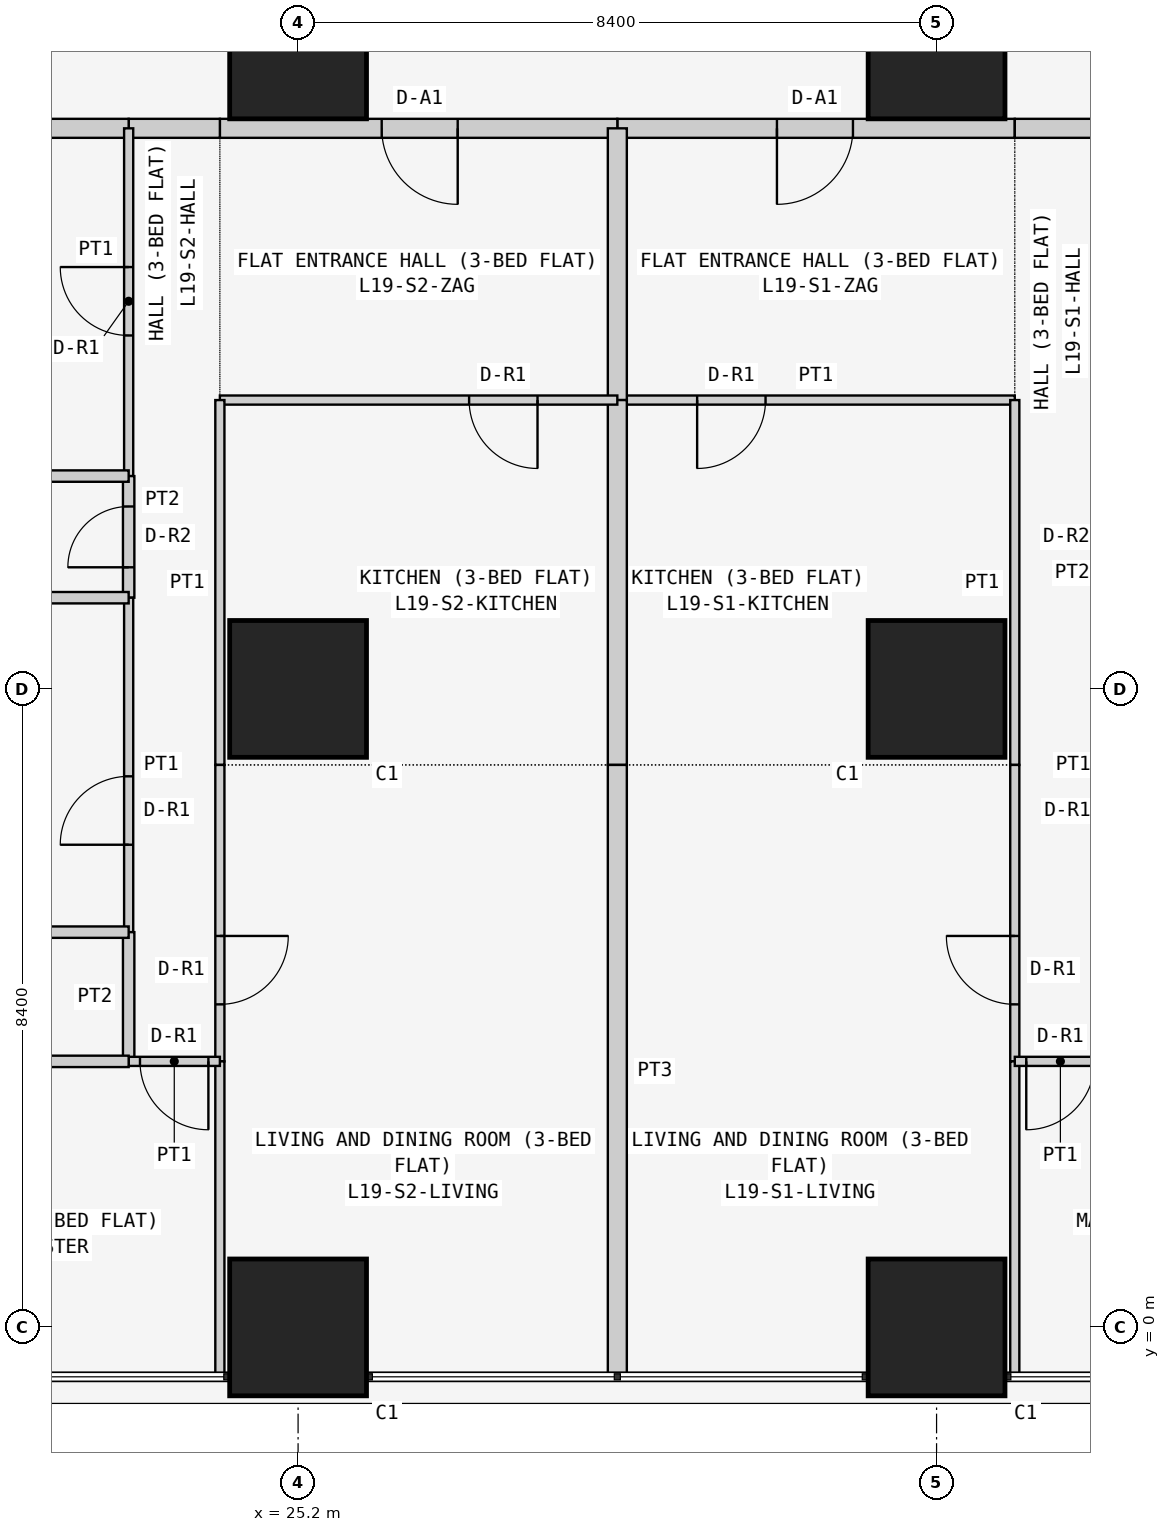
"""IFC4 building model, lengths in metres.
Left out: names, types, materials, properties, quantities, classifications, styles, units other than length and angle.
Written with IfcOpenShell. Run it as: python <this file> out.ifc"""

import sys

from ifc_helpers import new_model, si_unit, direction, frame, frame_2d, origin, origin_2d, place, context, subcontext, project, spatial, rectangle, extrude, element, fill, save


model = new_model("IFC4")
c1 = context("Model", 3, precision=1e-05, world=origin(), true_north=direction((0.0, 1.0)))
c2 = subcontext(c1, "Body", "Model", "MODEL_VIEW")
j1 = project(units=[si_unit("LENGTHUNIT", "METRE"), si_unit("PLANEANGLEUNIT", "RADIAN")], contexts=[c1])
p1 = place(None, origin())
s1 = spatial("IfcSite", under=j1, at=p1, CompositionType="ELEMENT")
p2 = place(p1, origin())
s2 = spatial("IfcBuilding", under=s1, at=p2, CompositionType="ELEMENT")
p3 = place(p2, frame((0.0, 0.0, 77.7)))
s3 = spatial("IfcBuildingStorey", under=s2, at=p3, CompositionType="ELEMENT", Elevation=77.7)
for number, where, z_axis, x_axis in (
    (1, (25.2, 0.0, 0.0), (0.0, 0.0, 1.0), (1.0, 0.0, 0.0)),
    (2, (25.2, 8.4, 0.0), (0.0, 0.0, 1.0), (1.0, 0.0, 0.0)),
    (3, (25.2, 16.8, 0.0), (0.0, 0.0, 1.0), (1.0, 0.0, 0.0)),
    (4, (33.6, 0.0, 0.0), (0.0, 0.0, 1.0), (1.0, 0.0, 0.0)),
    (5, (33.6, 8.4, 0.0), (0.0, 0.0, 1.0), (1.0, 0.0, 0.0)),
    (6, (33.6, 16.8, 0.0), (0.0, 0.0, 1.0), (1.0, 0.0, 0.0)),
):
    element("IfcColumn", number, at=place(p3, frame(where, z_axis=z_axis, x_axis=x_axis)), inside=s3, PredefinedType="COLUMN", context=c2, shape_type="SweptSolid", body=[
        extrude(rectangle(XDim=1.8, YDim=1.8, at=origin_2d()), origin(), (0.0, 0.0, 1.0), 3.6),
    ])
p4 = place(p3, frame((34.629, 15.775, 0.0), z_axis=(0.0, 0.0, 1.0), x_axis=(-1.0, 0.0, 0.0)))
e7 = element("IfcWall", 7, at=p4, inside=s3, PredefinedType="PARTITIONING", context=c2, shape_type="SweptSolid", body=[
    extrude(rectangle(XDim=5.229, YDim=0.25, at=frame_2d((2.615, 0.0))), origin(), (0.0, 0.0, 1.0), 3.45),
])
p5 = place(p4, frame((2.129, 0.0, 0.0)))
e8 = element("IfcOpeningElement", 8, at=p5, cuts=e7, PredefinedType="OPENING", context=c2, shape_type="SweptSolid", body=[
    extrude(rectangle(XDim=1.0, YDim=2.1, at=frame_2d((0.5, 1.05))), frame((0.0, 0.135, 0.0), z_axis=(0.0, -1.0, 0.0), x_axis=(1.0, 0.0, 0.0)), (0.0, 0.0, 1.0), 0.27),
])
p6 = place(p3, frame((35.829, 15.775, 0.0), z_axis=(0.0, 0.0, 1.0), x_axis=(-1.0, 0.0, 0.0)))
e9 = element("IfcWall", 9, at=p6, inside=s3, PredefinedType="PARTITIONING", context=c2, shape_type="SweptSolid", body=[
    extrude(rectangle(XDim=1.2, YDim=0.25, at=frame_2d((0.6, 0.0))), origin(), (0.0, 0.0, 1.0), 3.45),
])
p7 = place(p3, frame((29.4, 15.775, 0.0), z_axis=(0.0, 0.0, 1.0), x_axis=(-1.0, 0.0, 0.0)))
e10 = element("IfcWall", 10, at=p7, inside=s3, PredefinedType="PARTITIONING", context=c2, shape_type="SweptSolid", body=[
    extrude(rectangle(XDim=5.229, YDim=0.25, at=frame_2d((2.615, 0.0))), origin(), (0.0, 0.0, 1.0), 3.45),
])
p8 = place(p7, frame((2.1, 0.0, 0.0)))
e11 = element("IfcOpeningElement", 11, at=p8, cuts=e10, PredefinedType="OPENING", context=c2, shape_type="SweptSolid", body=[
    extrude(rectangle(XDim=1.0, YDim=2.1, at=frame_2d((0.5, 1.05))), frame((0.0, 0.135, 0.0), z_axis=(0.0, -1.0, 0.0), x_axis=(1.0, 0.0, 0.0)), (0.0, 0.0, 1.0), 0.27),
])
p9 = place(p3, frame((24.171, 15.775, 0.0), z_axis=(0.0, 0.0, 1.0), x_axis=(-1.0, 0.0, 0.0)))
e12 = element("IfcWall", 12, at=p9, inside=s3, PredefinedType="PARTITIONING", context=c2, shape_type="SweptSolid", body=[
    extrude(rectangle(XDim=1.2, YDim=0.25, at=frame_2d((0.6, 0.0))), origin(), (0.0, 0.0, 1.0), 3.45),
])
p10 = place(p3, frame((22.971, 15.775, 0.0), z_axis=(0.0, 0.0, 1.0), x_axis=(-1.0, 0.0, 0.0)))
e13 = element("IfcWall", 13, at=p10, inside=s3, PredefinedType="PARTITIONING", context=c2, shape_type="SweptSolid", body=[
    extrude(rectangle(XDim=6.871, YDim=0.25, at=frame_2d((3.436, 0.0))), origin(), (0.0, 0.0, 1.0), 3.45),
])
p11 = place(p3, frame((29.4, 12.2, 0.0), z_axis=(0.0, 0.0, 1.0), x_axis=(1.0, 0.0, 0.0)))
e14 = element("IfcWall", 14, at=p11, inside=s3, PredefinedType="PARTITIONING", context=c2, shape_type="SweptSolid", body=[
    extrude(rectangle(XDim=5.229, YDim=0.12, at=frame_2d((2.615, 0.0))), origin(), (0.0, 0.0, 1.0), 3.45),
])
p12 = place(p11, frame((1.05, 0.0, 0.0)))
e15 = element("IfcOpeningElement", 15, at=p12, cuts=e14, PredefinedType="OPENING", context=c2, shape_type="SweptSolid", body=[
    extrude(rectangle(XDim=0.9, YDim=2.1, at=frame_2d((0.45, 1.05))), frame((0.0, 0.07, 0.0), z_axis=(0.0, -1.0, 0.0), x_axis=(1.0, 0.0, 0.0)), (0.0, 0.0, 1.0), 0.14),
])
p13 = place(p3, frame((29.4, 15.775, 0.0), z_axis=(0.0, 0.0, 1.0), x_axis=(0.0, -1.0, 0.0)))
e16 = element("IfcWall", 16, at=p13, inside=s3, PredefinedType="PARTITIONING", context=c2, shape_type="SweptSolid", body=[
    extrude(rectangle(XDim=3.575, YDim=0.25, at=frame_2d((1.788, 0.0))), origin(), (0.0, 0.0, 1.0), 2.848),
])
p14 = place(p3, frame((34.629, 7.4, 0.0), z_axis=(0.0, 0.0, 1.0), x_axis=(0.0, 1.0, 0.0)))
e17 = element("IfcWall", 17, at=p14, inside=s3, PredefinedType="PARTITIONING", context=c2, shape_type="SweptSolid", body=[
    extrude(rectangle(XDim=4.8, YDim=0.12, at=frame_2d((2.4, 0.0))), origin(), (0.0, 0.0, 1.0), 3.45),
])
p15 = place(p3, frame((29.4, 12.2, 0.0), z_axis=(0.0, 0.0, 1.0), x_axis=(0.0, -1.0, 0.0)))
e18 = element("IfcWall", 18, at=p15, inside=s3, PredefinedType="PARTITIONING", context=c2, shape_type="SweptSolid", body=[
    extrude(rectangle(XDim=4.8, YDim=0.25, at=frame_2d((2.4, 0.0))), origin(), (0.0, 0.0, 1.0), 2.848),
])
p16 = place(p3, frame((34.629, 3.5, 0.0), z_axis=(0.0, 0.0, 1.0), x_axis=(0.0, 1.0, 0.0)))
e19 = element("IfcWall", 19, at=p16, inside=s3, PredefinedType="PARTITIONING", context=c2, shape_type="SweptSolid", body=[
    extrude(rectangle(XDim=3.9, YDim=0.12, at=frame_2d((1.95, 0.0))), origin(), (0.0, 0.0, 1.0), 3.45),
])
p17 = place(p16, frame((0.75, 0.0, 0.0)))
e20 = element("IfcOpeningElement", 20, at=p17, cuts=e19, PredefinedType="OPENING", context=c2, shape_type="SweptSolid", body=[
    extrude(rectangle(XDim=0.9, YDim=2.1, at=frame_2d((0.45, 1.05))), frame((0.0, 0.07, 0.0), z_axis=(0.0, -1.0, 0.0), x_axis=(1.0, 0.0, 0.0)), (0.0, 0.0, 1.0), 0.14),
])
p18 = place(p3, frame((34.629, -0.65, 0.0), z_axis=(0.0, 0.0, 1.0), x_axis=(0.0, 1.0, 0.0)))
e21 = element("IfcWall", 21, at=p18, inside=s3, PredefinedType="PARTITIONING", context=c2, shape_type="SweptSolid", body=[
    extrude(rectangle(XDim=4.15, YDim=0.12, at=frame_2d((2.075, 0.0))), origin(), (0.0, 0.0, 1.0), 3.45),
])
p19 = place(p3, frame((29.4, 7.4, 0.0), z_axis=(0.0, 0.0, 1.0), x_axis=(0.0, -1.0, 0.0)))
e22 = element("IfcWall", 22, at=p19, inside=s3, PredefinedType="PARTITIONING", context=c2, shape_type="SweptSolid", body=[
    extrude(rectangle(XDim=8.05, YDim=0.25, at=frame_2d((4.025, 0.0))), origin(), (0.0, 0.0, 1.0), 2.848),
])
p20 = place(p3, frame((34.629, 3.5, 0.0), z_axis=(0.0, 0.0, 1.0), x_axis=(1.0, 0.0, 0.0)))
e23 = element("IfcWall", 23, at=p20, inside=s3, PredefinedType="PARTITIONING", context=c2, shape_type="SweptSolid", body=[
    extrude(rectangle(XDim=1.2, YDim=0.12, at=frame_2d((0.6, 0.0))), origin(), (0.0, 0.0, 1.0), 3.45),
])
p21 = place(p20, frame((0.151, 0.0, 0.0)))
e24 = element("IfcOpeningElement", 24, at=p21, cuts=e23, PredefinedType="OPENING", context=c2, shape_type="SweptSolid", body=[
    extrude(rectangle(XDim=0.9, YDim=2.1, at=frame_2d((0.45, 1.05))), frame((0.0, 0.07, 0.0), z_axis=(0.0, -1.0, 0.0), x_axis=(1.0, 0.0, 0.0)), (0.0, 0.0, 1.0), 0.14),
])
p22 = place(p3, frame((29.4, 12.2, 0.0), z_axis=(0.0, 0.0, 1.0), x_axis=(-1.0, 0.0, 0.0)))
e25 = element("IfcWall", 25, at=p22, inside=s3, PredefinedType="PARTITIONING", context=c2, shape_type="SweptSolid", body=[
    extrude(rectangle(XDim=5.229, YDim=0.12, at=frame_2d((2.615, 0.0))), origin(), (0.0, 0.0, 1.0), 3.45),
])
p23 = place(p22, frame((1.05, 0.0, 0.0)))
e26 = element("IfcOpeningElement", 26, at=p23, cuts=e25, PredefinedType="OPENING", context=c2, shape_type="SweptSolid", body=[
    extrude(rectangle(XDim=0.9, YDim=2.1, at=frame_2d((0.45, 1.05))), frame((0.0, 0.07, 0.0), z_axis=(0.0, -1.0, 0.0), x_axis=(1.0, 0.0, 0.0)), (0.0, 0.0, 1.0), 0.14),
])
p24 = place(p3, frame((24.171, 7.4, 0.0), z_axis=(0.0, 0.0, 1.0), x_axis=(0.0, 1.0, 0.0)))
e27 = element("IfcWall", 27, at=p24, inside=s3, PredefinedType="PARTITIONING", context=c2, shape_type="SweptSolid", body=[
    extrude(rectangle(XDim=4.8, YDim=0.12, at=frame_2d((2.4, 0.0))), origin(), (0.0, 0.0, 1.0), 3.45),
])
p25 = place(p3, frame((24.171, 3.5, 0.0), z_axis=(0.0, 0.0, 1.0), x_axis=(0.0, 1.0, 0.0)))
e28 = element("IfcWall", 28, at=p25, inside=s3, PredefinedType="PARTITIONING", context=c2, shape_type="SweptSolid", body=[
    extrude(rectangle(XDim=3.9, YDim=0.12, at=frame_2d((1.95, 0.0))), origin(), (0.0, 0.0, 1.0), 3.45),
])
p26 = place(p25, frame((0.75, 0.0, 0.0)))
e29 = element("IfcOpeningElement", 29, at=p26, cuts=e28, PredefinedType="OPENING", context=c2, shape_type="SweptSolid", body=[
    extrude(rectangle(XDim=0.9, YDim=2.1, at=frame_2d((0.45, 1.05))), frame((0.0, 0.07, 0.0), z_axis=(0.0, -1.0, 0.0), x_axis=(1.0, 0.0, 0.0)), (0.0, 0.0, 1.0), 0.14),
])
p27 = place(p3, frame((24.171, -0.65, 0.0), z_axis=(0.0, 0.0, 1.0), x_axis=(0.0, 1.0, 0.0)))
e30 = element("IfcWall", 30, at=p27, inside=s3, PredefinedType="PARTITIONING", context=c2, shape_type="SweptSolid", body=[
    extrude(rectangle(XDim=4.15, YDim=0.12, at=frame_2d((2.075, 0.0))), origin(), (0.0, 0.0, 1.0), 3.45),
])
p28 = place(p3, frame((22.971, 11.2, 0.0), z_axis=(0.0, 0.0, 1.0), x_axis=(0.0, 1.0, 0.0)))
e31 = element("IfcWall", 31, at=p28, inside=s3, PredefinedType="PARTITIONING", context=c2, shape_type="SweptSolid", body=[
    extrude(rectangle(XDim=4.575, YDim=0.12, at=frame_2d((2.288, 0.0))), origin(), (0.0, 0.0, 1.0), 3.45),
])
p29 = place(p28, frame((1.85, 0.0, 0.0)))
e32 = element("IfcOpeningElement", 32, at=p29, cuts=e31, PredefinedType="OPENING", context=c2, shape_type="SweptSolid", body=[
    extrude(rectangle(XDim=0.9, YDim=2.1, at=frame_2d((0.45, 1.05))), frame((0.0, 0.07, 0.0), z_axis=(0.0, -1.0, 0.0), x_axis=(1.0, 0.0, 0.0)), (0.0, 0.0, 1.0), 0.14),
])
p30 = place(p3, frame((22.971, 9.6, 0.0), z_axis=(0.0, 0.0, 1.0), x_axis=(0.0, 1.0, 0.0)))
e33 = element("IfcWall", 33, at=p30, inside=s3, PredefinedType="PARTITIONING", context=c2, shape_type="SweptSolid", body=[
    extrude(rectangle(XDim=1.6, YDim=0.15, at=frame_2d((0.8, 0.0))), origin(), (0.0, 0.0, 1.0), 3.45),
])
p31 = place(p30, frame((0.4, 0.0, 0.0)))
e34 = element("IfcOpeningElement", 34, at=p31, cuts=e33, PredefinedType="OPENING", context=c2, shape_type="SweptSolid", body=[
    extrude(rectangle(XDim=0.8, YDim=2.1, at=frame_2d((0.4, 1.05))), frame((0.0, 0.085, 0.0), z_axis=(0.0, -1.0, 0.0), x_axis=(1.0, 0.0, 0.0)), (0.0, 0.0, 1.0), 0.17),
])
p32 = place(p3, frame((22.971, 5.2, 0.0), z_axis=(0.0, 0.0, 1.0), x_axis=(0.0, 1.0, 0.0)))
e35 = element("IfcWall", 35, at=p32, inside=s3, PredefinedType="PARTITIONING", context=c2, shape_type="SweptSolid", body=[
    extrude(rectangle(XDim=4.4, YDim=0.12, at=frame_2d((2.2, 0.0))), origin(), (0.0, 0.0, 1.0), 3.45),
])
p33 = place(p32, frame((1.15, 0.0, 0.0)))
e36 = element("IfcOpeningElement", 36, at=p33, cuts=e35, PredefinedType="OPENING", context=c2, shape_type="SweptSolid", body=[
    extrude(rectangle(XDim=0.9, YDim=2.1, at=frame_2d((0.45, 1.05))), frame((0.0, 0.07, 0.0), z_axis=(0.0, -1.0, 0.0), x_axis=(1.0, 0.0, 0.0)), (0.0, 0.0, 1.0), 0.14),
])
p34 = place(p3, frame((22.971, 3.5, 0.0), z_axis=(0.0, 0.0, 1.0), x_axis=(0.0, 1.0, 0.0)))
e37 = element("IfcWall", 37, at=p34, inside=s3, PredefinedType="PARTITIONING", context=c2, shape_type="SweptSolid", body=[
    extrude(rectangle(XDim=1.7, YDim=0.15, at=frame_2d((0.85, 0.0))), origin(), (0.0, 0.0, 1.0), 3.45),
])
p35 = place(p3, frame((24.171, 3.5, 0.0), z_axis=(0.0, 0.0, 1.0), x_axis=(-1.0, 0.0, 0.0)))
e38 = element("IfcWall", 38, at=p35, inside=s3, PredefinedType="PARTITIONING", context=c2, shape_type="SweptSolid", body=[
    extrude(rectangle(XDim=1.2, YDim=0.12, at=frame_2d((0.6, 0.0))), origin(), (0.0, 0.0, 1.0), 3.45),
])
p36 = place(p35, frame((0.151, 0.0, 0.0)))
e39 = element("IfcOpeningElement", 39, at=p36, cuts=e38, PredefinedType="OPENING", context=c2, shape_type="SweptSolid", body=[
    extrude(rectangle(XDim=0.9, YDim=2.1, at=frame_2d((0.45, 1.05))), frame((0.0, 0.07, 0.0), z_axis=(0.0, -1.0, 0.0), x_axis=(1.0, 0.0, 0.0)), (0.0, 0.0, 1.0), 0.14),
])
for number, where, z_axis, x_axis in (
    (40, (22.971, 11.2, 0.0), (0.0, 0.0, 1.0), (-1.0, 0.0, 0.0)),
    (41, (22.971, 9.6, 0.0), (0.0, 0.0, 1.0), (-1.0, 0.0, 0.0)),
    (42, (22.971, 5.2, 0.0), (0.0, 0.0, 1.0), (-1.0, 0.0, 0.0)),
):
    element("IfcWall", number, at=place(p3, frame(where, z_axis=z_axis, x_axis=x_axis)), inside=s3, PredefinedType="PARTITIONING", context=c2, shape_type="SweptSolid", body=[
        extrude(rectangle(XDim=6.871, YDim=0.15, at=frame_2d((3.436, 0.0))), origin(), (0.0, 0.0, 1.0), 3.45),
    ])
p37 = place(p3, frame((22.971, 3.5, 0.0), z_axis=(0.0, 0.0, 1.0), x_axis=(-1.0, 0.0, 0.0)))
e43 = element("IfcWall", 43, at=p37, inside=s3, PredefinedType="PARTITIONING", context=c2, shape_type="SweptSolid", body=[
    extrude(rectangle(XDim=6.871, YDim=0.15, at=frame_2d((3.436, 0.0))), origin(), (0.0, 0.0, 1.0), 3.45),
])
p38 = place(p37, frame((3.171, 0.0, 0.0)))
e44 = element("IfcOpeningElement", 44, at=p38, cuts=e43, PredefinedType="OPENING", context=c2, shape_type="SweptSolid", body=[
    extrude(rectangle(XDim=0.8, YDim=2.1, at=frame_2d((0.4, 1.05))), frame((0.0, 0.085, 0.0), z_axis=(0.0, -1.0, 0.0), x_axis=(1.0, 0.0, 0.0)), (0.0, 0.0, 1.0), 0.17),
])
p39 = place(p5, origin())
e45 = element("IfcDoor", 45, at=p39, inside=s3, OperationType="SINGLE_SWING_RIGHT", PredefinedType="DOOR", context=c2, shape_type="SweptSolid", body=[
    extrude(rectangle(XDim=1.0, YDim=2.1, at=frame_2d((0.5, 1.05))), frame((0.0, 0.025, 0.0), z_axis=(0.0, -1.0, 0.0), x_axis=(1.0, 0.0, 0.0)), (0.0, 0.0, 1.0), 0.05),
])
fill(e8, e45)
p40 = place(p12, frame((0.9, 0.0, 0.0), z_axis=(0.0, 0.0, 1.0), x_axis=(-1.0, 0.0, 0.0)))
e46 = element("IfcDoor", 46, at=p40, inside=s3, OperationType="SINGLE_SWING_RIGHT", PredefinedType="DOOR", context=c2, shape_type="SweptSolid", body=[
    extrude(rectangle(XDim=0.9, YDim=2.1, at=frame_2d((0.45, 1.05))), frame((0.0, 0.025, 0.0), z_axis=(0.0, -1.0, 0.0), x_axis=(1.0, 0.0, 0.0)), (0.0, 0.0, 1.0), 0.05),
])
fill(e15, e46)
p41 = place(p17, origin())
e47 = element("IfcDoor", 47, at=p41, inside=s3, OperationType="SINGLE_SWING_RIGHT", PredefinedType="DOOR", context=c2, shape_type="SweptSolid", body=[
    extrude(rectangle(XDim=0.9, YDim=2.1, at=frame_2d((0.45, 1.05))), frame((0.0, 0.025, 0.0), z_axis=(0.0, -1.0, 0.0), x_axis=(1.0, 0.0, 0.0)), (0.0, 0.0, 1.0), 0.05),
])
fill(e20, e47)
p42 = place(p21, frame((0.9, 0.0, 0.0), z_axis=(0.0, 0.0, 1.0), x_axis=(-1.0, 0.0, 0.0)))
e48 = element("IfcDoor", 48, at=p42, inside=s3, OperationType="SINGLE_SWING_RIGHT", PredefinedType="DOOR", context=c2, shape_type="SweptSolid", body=[
    extrude(rectangle(XDim=0.9, YDim=2.1, at=frame_2d((0.45, 1.05))), frame((0.0, 0.025, 0.0), z_axis=(0.0, -1.0, 0.0), x_axis=(1.0, 0.0, 0.0)), (0.0, 0.0, 1.0), 0.05),
])
fill(e24, e48)
p43 = place(p8, origin())
e49 = element("IfcDoor", 49, at=p43, inside=s3, OperationType="SINGLE_SWING_LEFT", PredefinedType="DOOR", context=c2, shape_type="SweptSolid", body=[
    extrude(rectangle(XDim=1.0, YDim=2.1, at=frame_2d((0.5, 1.05))), frame((0.0, 0.025, 0.0), z_axis=(0.0, -1.0, 0.0), x_axis=(1.0, 0.0, 0.0)), (0.0, 0.0, 1.0), 0.05),
])
fill(e11, e49)
p44 = place(p23, origin())
e50 = element("IfcDoor", 50, at=p44, inside=s3, OperationType="SINGLE_SWING_LEFT", PredefinedType="DOOR", context=c2, shape_type="SweptSolid", body=[
    extrude(rectangle(XDim=0.9, YDim=2.1, at=frame_2d((0.45, 1.05))), frame((0.0, 0.025, 0.0), z_axis=(0.0, -1.0, 0.0), x_axis=(1.0, 0.0, 0.0)), (0.0, 0.0, 1.0), 0.05),
])
fill(e26, e50)
p45 = place(p26, frame((0.9, 0.0, 0.0), z_axis=(0.0, 0.0, 1.0), x_axis=(-1.0, 0.0, 0.0)))
e51 = element("IfcDoor", 51, at=p45, inside=s3, OperationType="SINGLE_SWING_LEFT", PredefinedType="DOOR", context=c2, shape_type="SweptSolid", body=[
    extrude(rectangle(XDim=0.9, YDim=2.1, at=frame_2d((0.45, 1.05))), frame((0.0, 0.025, 0.0), z_axis=(0.0, -1.0, 0.0), x_axis=(1.0, 0.0, 0.0)), (0.0, 0.0, 1.0), 0.05),
])
fill(e29, e51)
p46 = place(p29, origin())
e52 = element("IfcDoor", 52, at=p46, inside=s3, OperationType="SINGLE_SWING_RIGHT", PredefinedType="DOOR", context=c2, shape_type="SweptSolid", body=[
    extrude(rectangle(XDim=0.9, YDim=2.1, at=frame_2d((0.45, 1.05))), frame((0.0, 0.025, 0.0), z_axis=(0.0, -1.0, 0.0), x_axis=(1.0, 0.0, 0.0)), (0.0, 0.0, 1.0), 0.05),
])
fill(e32, e52)
p47 = place(p31, origin())
e53 = element("IfcDoor", 53, at=p47, inside=s3, OperationType="SINGLE_SWING_LEFT", PredefinedType="DOOR", context=c2, shape_type="SweptSolid", body=[
    extrude(rectangle(XDim=0.8, YDim=2.1, at=frame_2d((0.4, 1.05))), frame((0.0, 0.025, 0.0), z_axis=(0.0, -1.0, 0.0), x_axis=(1.0, 0.0, 0.0)), (0.0, 0.0, 1.0), 0.05),
])
fill(e34, e53)
p48 = place(p33, origin())
e54 = element("IfcDoor", 54, at=p48, inside=s3, OperationType="SINGLE_SWING_LEFT", PredefinedType="DOOR", context=c2, shape_type="SweptSolid", body=[
    extrude(rectangle(XDim=0.9, YDim=2.1, at=frame_2d((0.45, 1.05))), frame((0.0, 0.025, 0.0), z_axis=(0.0, -1.0, 0.0), x_axis=(1.0, 0.0, 0.0)), (0.0, 0.0, 1.0), 0.05),
])
fill(e36, e54)
p49 = place(p36, origin())
e55 = element("IfcDoor", 55, at=p49, inside=s3, OperationType="SINGLE_SWING_LEFT", PredefinedType="DOOR", context=c2, shape_type="SweptSolid", body=[
    extrude(rectangle(XDim=0.9, YDim=2.1, at=frame_2d((0.45, 1.05))), frame((0.0, 0.025, 0.0), z_axis=(0.0, -1.0, 0.0), x_axis=(1.0, 0.0, 0.0)), (0.0, 0.0, 1.0), 0.05),
])
fill(e39, e55)
save(model, sys.argv[1])
